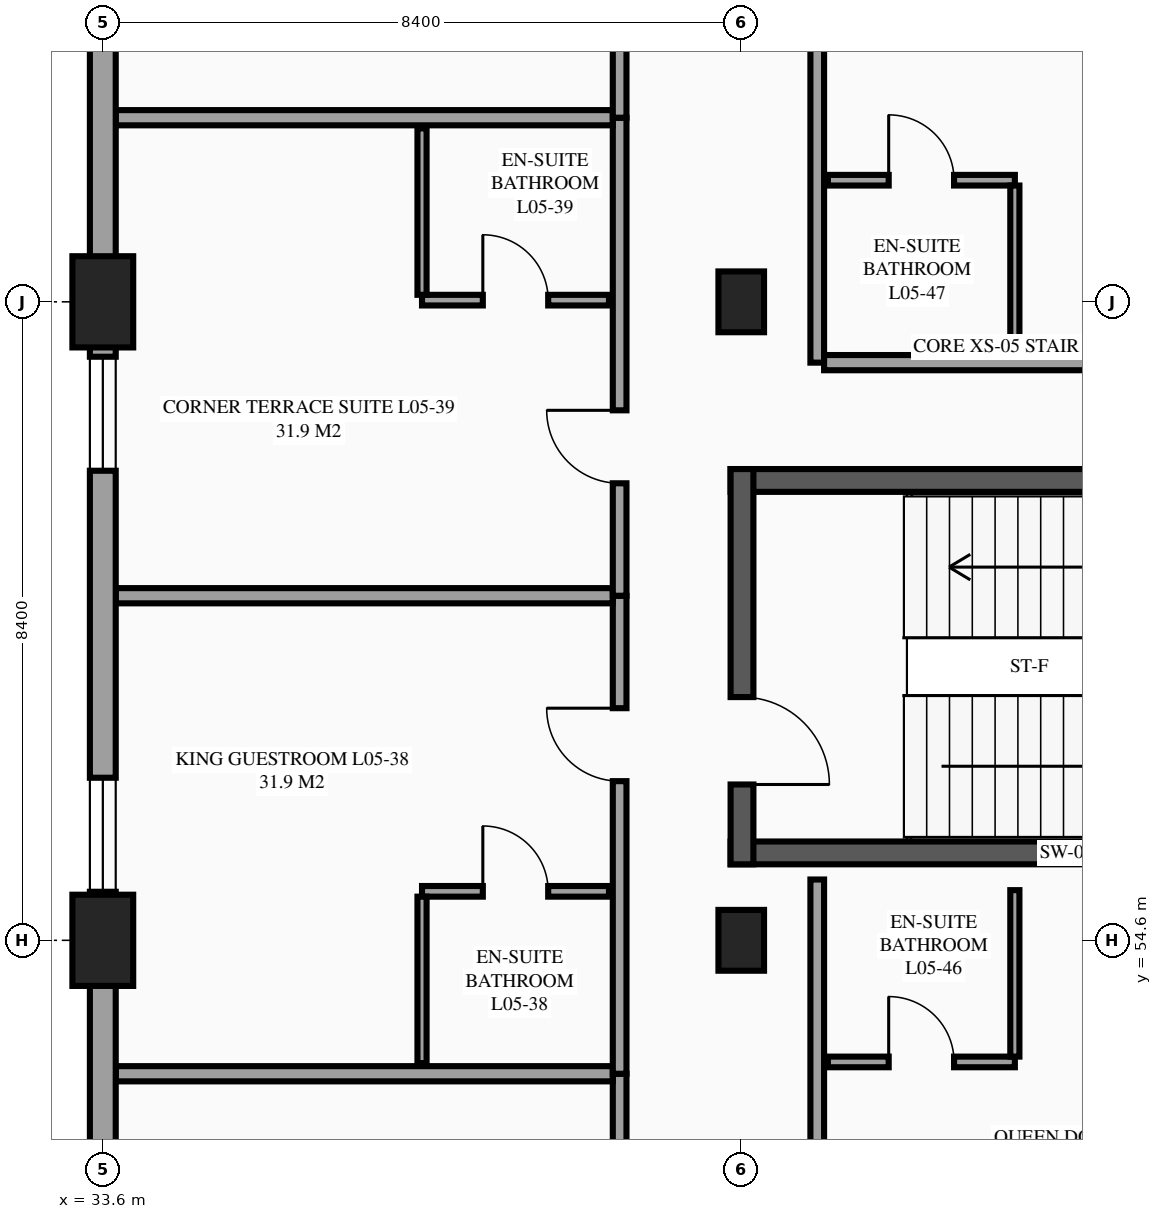
"""IFC4 building model, lengths in metres.
Left out: names, types, materials, properties, quantities, classifications, styles, units other than length and angle.
Written with IfcOpenShell. Run it as: python <this file> out.ifc"""

import sys

from ifc_helpers import new_model, si_unit, direction, frame, frame_2d, origin, origin_2d, place, context, subcontext, project, spatial, rectangle, extrude, element, fill, save


model = new_model("IFC4")
c1 = context("Model", 3, precision=1e-05, world=origin(), true_north=direction((0.0, 1.0)))
c2 = subcontext(c1, "Body", "Model", "MODEL_VIEW")
j1 = project(units=[si_unit("LENGTHUNIT", "METRE"), si_unit("PLANEANGLEUNIT", "RADIAN")], contexts=[c1])
p1 = place(None, origin())
s1 = spatial("IfcSite", under=j1, at=p1, CompositionType="ELEMENT")
p2 = place(p1, origin())
s2 = spatial("IfcBuilding", under=s1, at=p2, CompositionType="ELEMENT")
p3 = place(p2, frame((0.0, 0.0, 21.9)))
s3 = spatial("IfcBuildingStorey", under=s2, at=p3, CompositionType="ELEMENT", Elevation=21.9)
for number, where, z_axis, x_axis in (
    (1, (33.6, 54.6, 0.0), (0.0, 0.0, 1.0), (1.0, 0.0, 0.0)),
    (2, (33.6, 63.0, 0.0), (0.0, 0.0, 1.0), (1.0, 0.0, 0.0)),
):
    element("IfcColumn", number, at=place(p3, frame(where, z_axis=z_axis, x_axis=x_axis)), inside=s3, PredefinedType="COLUMN", context=c2, shape_type="SweptSolid", body=[
        extrude(rectangle(XDim=0.8, YDim=1.2, at=origin_2d()), origin(), (0.0, 0.0, 1.0), 3.6),
    ])
for number, where, z_axis, x_axis in (
    (3, (42.0, 54.6, 0.0), (0.0, 0.0, 1.0), (1.0, 0.0, 0.0)),
    (4, (42.0, 63.0, 0.0), (0.0, 0.0, 1.0), (1.0, 0.0, 0.0)),
):
    element("IfcColumn", number, at=place(p3, frame(where, z_axis=z_axis, x_axis=x_axis)), inside=s3, PredefinedType="COLUMN", context=c2, shape_type="SweptSolid", body=[
        extrude(rectangle(XDim=0.6, YDim=0.8, at=origin_2d()), origin(), (0.0, 0.0, 1.0), 3.6),
    ])
for number, where, z_axis, x_axis in (
    (5, (41.86, 55.75, 0.0), (0.0, 0.0, 1.0), (1.0, 0.0, 0.0)),
    (6, (50.7, 60.65, 0.0), (0.0, 0.0, 1.0), (-1.0, 0.0, 0.0)),
):
    element("IfcWall", number, at=place(p3, frame(where, z_axis=z_axis, x_axis=x_axis)), inside=s3, PredefinedType="SHEAR", context=c2, shape_type="SweptSolid", body=[
        extrude(rectangle(XDim=8.84, YDim=0.3, at=frame_2d((4.42, 0.0))), origin(), (0.0, 0.0, 1.0), 3.6),
    ])
p4 = place(p3, frame((42.01, 60.8, 0.0), z_axis=(0.0, 0.0, 1.0), x_axis=(0.0, -1.0, 0.0)))
e7 = element("IfcWall", 7, at=p4, inside=s3, PredefinedType="SHEAR", context=c2, shape_type="SweptSolid", body=[
    extrude(rectangle(XDim=5.2, YDim=0.3, at=frame_2d((2.6, 0.0))), origin(), (0.0, 0.0, 1.0), 3.6),
])
p5 = place(p4, frame((3.0, 0.0, 0.0)))
e8 = element("IfcOpeningElement", 8, at=p5, cuts=e7, PredefinedType="OPENING", context=c2, shape_type="SweptSolid", body=[
    extrude(rectangle(XDim=1.15, YDim=2.15, at=frame_2d((0.575, 1.075))), frame((0.0, 0.16, 0.0), z_axis=(0.0, -1.0, 0.0), x_axis=(1.0, 0.0, 0.0)), (0.0, 0.0, 1.0), 0.32),
])
p6 = place(p3, frame((40.4, 46.556, 0.0), z_axis=(0.0, 0.0, 1.0), x_axis=(0.0, 1.0, 0.0)))
e9 = element("IfcWall", 9, at=p6, inside=s3, PredefinedType="PARTITIONING", context=c2, shape_type="SweptSolid", body=[
    extrude(rectangle(XDim=6.289, YDim=0.18, at=frame_2d((3.145, 0.0))), origin(), (0.0, 0.0, 1.0), 3.375),
])
p7 = place(p6, frame((3.849, 0.0, 0.0)))
e10 = element("IfcOpeningElement", 10, at=p7, cuts=e9, PredefinedType="OPENING", context=c2, shape_type="SweptSolid", body=[
    extrude(rectangle(XDim=0.96, YDim=2.15, at=frame_2d((0.48, 1.075))), frame((0.0, 0.1, 0.0), z_axis=(0.0, -1.0, 0.0), x_axis=(1.0, 0.0, 0.0)), (0.0, 0.0, 1.0), 0.2),
])
p8 = place(p3, frame((33.77, 52.844, 0.0), z_axis=(0.0, 0.0, 1.0), x_axis=(1.0, 0.0, 0.0)))
e11 = element("IfcWall", 11, at=p8, inside=s3, PredefinedType="PARTITIONING", context=c2, shape_type="SweptSolid", body=[
    extrude(rectangle(XDim=6.54, YDim=0.2, at=frame_2d((3.27, 0.0))), origin(), (0.0, 0.0, 1.0), 3.375),
])
p9 = place(p3, frame((40.4, 52.844, 0.0), z_axis=(0.0, 0.0, 1.0), x_axis=(0.0, 1.0, 0.0)))
e12 = element("IfcWall", 12, at=p9, inside=s3, PredefinedType="PARTITIONING", context=c2, shape_type="SweptSolid", body=[
    extrude(rectangle(XDim=6.289, YDim=0.18, at=frame_2d((3.145, 0.0))), origin(), (0.0, 0.0, 1.0), 3.375),
])
p10 = place(p9, frame((3.85, 0.0, 0.0)))
e13 = element("IfcOpeningElement", 13, at=p10, cuts=e12, PredefinedType="OPENING", context=c2, shape_type="SweptSolid", body=[
    extrude(rectangle(XDim=0.96, YDim=2.15, at=frame_2d((0.48, 1.075))), frame((0.0, 0.1, 0.0), z_axis=(0.0, -1.0, 0.0), x_axis=(1.0, 0.0, 0.0)), (0.0, 0.0, 1.0), 0.2),
])
p11 = place(p3, frame((33.77, 59.133, 0.0), z_axis=(0.0, 0.0, 1.0), x_axis=(1.0, 0.0, 0.0)))
e14 = element("IfcWall", 14, at=p11, inside=s3, PredefinedType="PARTITIONING", context=c2, shape_type="SweptSolid", body=[
    extrude(rectangle(XDim=6.54, YDim=0.2, at=frame_2d((3.27, 0.0))), origin(), (0.0, 0.0, 1.0), 3.375),
])
p12 = place(p3, frame((37.8, 55.244, 0.0), z_axis=(0.0, 0.0, 1.0), x_axis=(1.0, 0.0, 0.0)))
e15 = element("IfcWall", 15, at=p12, inside=s3, PredefinedType="PARTITIONING", context=c2, shape_type="SweptSolid", body=[
    extrude(rectangle(XDim=2.46, YDim=0.14, at=frame_2d((1.23, 0.0))), origin(), (0.0, 0.0, 1.0), 3.375),
])
p13 = place(p12, frame((0.8, 0.0, 0.0)))
e16 = element("IfcOpeningElement", 16, at=p13, cuts=e15, PredefinedType="OPENING", context=c2, shape_type="SweptSolid", body=[
    extrude(rectangle(XDim=0.86, YDim=2.1, at=frame_2d((0.43, 1.05))), frame((0.0, 0.08, 0.0), z_axis=(0.0, -1.0, 0.0), x_axis=(1.0, 0.0, 0.0)), (0.0, 0.0, 1.0), 0.16),
])
p14 = place(p3, frame((37.8, 52.984, 0.0), z_axis=(0.0, 0.0, 1.0), x_axis=(0.0, 1.0, 0.0)))
e17 = element("IfcWall", 17, at=p14, inside=s3, PredefinedType="PARTITIONING", context=c2, shape_type="SweptSolid", body=[
    extrude(rectangle(XDim=2.19, YDim=0.12, at=frame_2d((1.095, 0.0))), origin(), (0.0, 0.0, 1.0), 3.375),
])
p15 = place(p3, frame((40.4, 59.133, 0.0), z_axis=(0.0, 0.0, 1.0), x_axis=(0.0, 1.0, 0.0)))
e18 = element("IfcWall", 18, at=p15, inside=s3, PredefinedType="PARTITIONING", context=c2, shape_type="SweptSolid", body=[
    extrude(rectangle(XDim=6.289, YDim=0.18, at=frame_2d((3.145, 0.0))), origin(), (0.0, 0.0, 1.0), 3.375),
])
p16 = place(p15, frame((1.479, 0.0, 0.0)))
e19 = element("IfcOpeningElement", 19, at=p16, cuts=e18, PredefinedType="OPENING", context=c2, shape_type="SweptSolid", body=[
    extrude(rectangle(XDim=0.96, YDim=2.15, at=frame_2d((0.48, 1.075))), frame((0.0, 0.1, 0.0), z_axis=(0.0, -1.0, 0.0), x_axis=(1.0, 0.0, 0.0)), (0.0, 0.0, 1.0), 0.2),
])
p17 = place(p3, frame((33.77, 65.422, 0.0), z_axis=(0.0, 0.0, 1.0), x_axis=(1.0, 0.0, 0.0)))
e20 = element("IfcWall", 20, at=p17, inside=s3, PredefinedType="PARTITIONING", context=c2, shape_type="SweptSolid", body=[
    extrude(rectangle(XDim=6.54, YDim=0.2, at=frame_2d((3.27, 0.0))), origin(), (0.0, 0.0, 1.0), 3.375),
])
p18 = place(p3, frame((37.8, 63.022, 0.0), z_axis=(0.0, 0.0, 1.0), x_axis=(1.0, 0.0, 0.0)))
e21 = element("IfcWall", 21, at=p18, inside=s3, PredefinedType="PARTITIONING", context=c2, shape_type="SweptSolid", body=[
    extrude(rectangle(XDim=2.46, YDim=0.14, at=frame_2d((1.23, 0.0))), origin(), (0.0, 0.0, 1.0), 2.68),
])
p19 = place(p18, frame((0.8, 0.0, 0.0)))
e22 = element("IfcOpeningElement", 22, at=p19, cuts=e21, PredefinedType="OPENING", context=c2, shape_type="SweptSolid", body=[
    extrude(rectangle(XDim=0.86, YDim=2.1, at=frame_2d((0.43, 1.05))), frame((0.0, 0.08, 0.0), z_axis=(0.0, -1.0, 0.0), x_axis=(1.0, 0.0, 0.0)), (0.0, 0.0, 1.0), 0.16),
])
p20 = place(p3, frame((37.8, 63.092, 0.0), z_axis=(0.0, 0.0, 1.0), x_axis=(0.0, 1.0, 0.0)))
e23 = element("IfcWall", 23, at=p20, inside=s3, PredefinedType="PARTITIONING", context=c2, shape_type="SweptSolid", body=[
    extrude(rectangle(XDim=2.19, YDim=0.12, at=frame_2d((1.095, 0.0))), origin(), (0.0, 0.0, 1.0), 3.375),
])
p21 = place(p3, frame((40.4, 65.422, 0.0), z_axis=(0.0, 0.0, 1.0), x_axis=(0.0, 1.0, 0.0)))
e24 = element("IfcWall", 24, at=p21, inside=s3, PredefinedType="PARTITIONING", context=c2, shape_type="SweptSolid", body=[
    extrude(rectangle(XDim=6.289, YDim=0.18, at=frame_2d((3.145, 0.0))), origin(), (0.0, 0.0, 1.0), 3.375),
])
p22 = place(p21, frame((1.479, 0.0, 0.0)))
e25 = element("IfcOpeningElement", 25, at=p22, cuts=e24, PredefinedType="OPENING", context=c2, shape_type="SweptSolid", body=[
    extrude(rectangle(XDim=0.96, YDim=2.15, at=frame_2d((0.48, 1.075))), frame((0.0, 0.1, 0.0), z_axis=(0.0, -1.0, 0.0), x_axis=(1.0, 0.0, 0.0)), (0.0, 0.0, 1.0), 0.2),
])
p23 = place(p3, frame((43.0, 49.4, 0.0), z_axis=(0.0, 0.0, 1.0), x_axis=(0.0, 1.0, 0.0)))
e26 = element("IfcWall", 26, at=p23, inside=s3, PredefinedType="PARTITIONING", context=c2, shape_type="SweptSolid", body=[
    extrude(rectangle(XDim=6.0, YDim=0.18, at=frame_2d((3.0, 0.0))), origin(), (0.0, 0.0, 1.0), 3.375),
])
p24 = place(p23, frame((1.335, 0.0, 0.0)))
e27 = element("IfcOpeningElement", 27, at=p24, cuts=e26, PredefinedType="OPENING", context=c2, shape_type="SweptSolid", body=[
    extrude(rectangle(XDim=0.96, YDim=2.15, at=frame_2d((0.48, 1.075))), frame((0.0, 0.1, 0.0), z_axis=(0.0, -1.0, 0.0), x_axis=(1.0, 0.0, 0.0)), (0.0, 0.0, 1.0), 0.2),
])
p25 = place(p3, frame((43.14, 53.0, 0.0), z_axis=(0.0, 0.0, 1.0), x_axis=(1.0, 0.0, 0.0)))
e28 = element("IfcWall", 28, at=p25, inside=s3, PredefinedType="PARTITIONING", context=c2, shape_type="SweptSolid", body=[
    extrude(rectangle(XDim=2.46, YDim=0.14, at=frame_2d((1.23, 0.0))), origin(), (0.0, 0.0, 1.0), 3.375),
])
p26 = place(p25, frame((0.8, 0.0, 0.0)))
e29 = element("IfcOpeningElement", 29, at=p26, cuts=e28, PredefinedType="OPENING", context=c2, shape_type="SweptSolid", body=[
    extrude(rectangle(XDim=0.86, YDim=2.1, at=frame_2d((0.43, 1.05))), frame((0.0, 0.08, 0.0), z_axis=(0.0, -1.0, 0.0), x_axis=(1.0, 0.0, 0.0)), (0.0, 0.0, 1.0), 0.16),
])
p27 = place(p3, frame((45.6, 53.07, 0.0), z_axis=(0.0, 0.0, 1.0), x_axis=(0.0, 1.0, 0.0)))
e30 = element("IfcWall", 30, at=p27, inside=s3, PredefinedType="PARTITIONING", context=c2, shape_type="SweptSolid", body=[
    extrude(rectangle(XDim=2.19, YDim=0.12, at=frame_2d((1.095, 0.0))), origin(), (0.0, 0.0, 1.0), 3.375),
])
p28 = place(p3, frame((43.0, 62.2, 0.0), z_axis=(0.0, 0.0, 1.0), x_axis=(0.0, 1.0, 0.0)))
e31 = element("IfcWall", 31, at=p28, inside=s3, PredefinedType="PARTITIONING", context=c2, shape_type="SweptSolid", body=[
    extrude(rectangle(XDim=7.9, YDim=0.18, at=frame_2d((3.95, 0.0))), origin(), (0.0, 0.0, 1.0), 3.375),
])
p29 = place(p28, frame((4.655, 0.0, 0.0)))
e32 = element("IfcOpeningElement", 32, at=p29, cuts=e31, PredefinedType="OPENING", context=c2, shape_type="SweptSolid", body=[
    extrude(rectangle(XDim=0.96, YDim=2.15, at=frame_2d((0.48, 1.075))), frame((0.0, 0.1, 0.0), z_axis=(0.0, -1.0, 0.0), x_axis=(1.0, 0.0, 0.0)), (0.0, 0.0, 1.0), 0.2),
])
p30 = place(p3, frame((43.09, 62.2, 0.0), z_axis=(0.0, 0.0, 1.0), x_axis=(1.0, 0.0, 0.0)))
e33 = element("IfcWall", 33, at=p30, inside=s3, PredefinedType="PARTITIONING", context=c2, shape_type="SweptSolid", body=[
    extrude(rectangle(XDim=7.14, YDim=0.2, at=frame_2d((3.57, 0.0))), origin(), (0.0, 0.0, 1.0), 3.375),
])
p31 = place(p3, frame((43.14, 64.6, 0.0), z_axis=(0.0, 0.0, 1.0), x_axis=(1.0, 0.0, 0.0)))
e34 = element("IfcWall", 34, at=p31, inside=s3, PredefinedType="PARTITIONING", context=c2, shape_type="SweptSolid", body=[
    extrude(rectangle(XDim=2.46, YDim=0.14, at=frame_2d((1.23, 0.0))), origin(), (0.0, 0.0, 1.0), 3.375),
])
p32 = place(p31, frame((0.8, 0.0, 0.0)))
e35 = element("IfcOpeningElement", 35, at=p32, cuts=e34, PredefinedType="OPENING", context=c2, shape_type="SweptSolid", body=[
    extrude(rectangle(XDim=0.86, YDim=2.1, at=frame_2d((0.43, 1.05))), frame((0.0, 0.08, 0.0), z_axis=(0.0, -1.0, 0.0), x_axis=(1.0, 0.0, 0.0)), (0.0, 0.0, 1.0), 0.16),
])
p33 = place(p3, frame((45.6, 62.34, 0.0), z_axis=(0.0, 0.0, 1.0), x_axis=(0.0, 1.0, 0.0)))
e36 = element("IfcWall", 36, at=p33, inside=s3, PredefinedType="PARTITIONING", context=c2, shape_type="SweptSolid", body=[
    extrude(rectangle(XDim=2.19, YDim=0.12, at=frame_2d((1.095, 0.0))), origin(), (0.0, 0.0, 1.0), 3.375),
])
p34 = place(p3, frame((33.6, 79.8, 0.0), z_axis=(0.0, 0.0, 1.0), x_axis=(0.0, -1.0, 0.0)))
e37 = element("IfcWall", 37, at=p34, inside=s3, PredefinedType="STANDARD", context=c2, shape_type="SweptSolid", body=[
    extrude(rectangle(XDim=16.8, YDim=0.34, at=frame_2d((8.4, 0.0))), origin(), (0.0, 0.0, 1.0), 2.63),
])
p35 = place(p34, frame((10.633, 0.0, 0.85)))
e38 = element("IfcOpeningElement", 38, at=p35, cuts=e37, PredefinedType="OPENING", context=c2, shape_type="SweptSolid", body=[
    extrude(rectangle(XDim=1.2, YDim=1.5, at=frame_2d((0.6, 0.75))), frame((0.0, 0.18, 0.0), z_axis=(0.0, -1.0, 0.0), x_axis=(1.0, 0.0, 0.0)), (0.0, 0.0, 1.0), 0.36),
])
p36 = place(p34, frame((4.195, 0.0, 0.85)))
e39 = element("IfcOpeningElement", 39, at=p36, cuts=e37, PredefinedType="OPENING", context=c2, shape_type="SweptSolid", body=[
    extrude(rectangle(XDim=1.5, YDim=1.5, at=frame_2d((0.75, 0.75))), frame((0.0, 0.18, 0.0), z_axis=(0.0, -1.0, 0.0), x_axis=(1.0, 0.0, 0.0)), (0.0, 0.0, 1.0), 0.36),
])
p37 = place(p3, frame((33.6, 63.0, 0.0), z_axis=(0.0, 0.0, 1.0), x_axis=(0.0, -1.0, 0.0)))
e40 = element("IfcWall", 40, at=p37, inside=s3, PredefinedType="STANDARD", context=c2, shape_type="SweptSolid", body=[
    extrude(rectangle(XDim=8.4, YDim=0.34, at=frame_2d((4.2, 0.0))), origin(), (0.0, 0.0, 1.0), 3.126),
])
p38 = place(p37, frame((6.261, 0.0, 0.85)))
e41 = element("IfcOpeningElement", 41, at=p38, cuts=e40, PredefinedType="OPENING", context=c2, shape_type="SweptSolid", body=[
    extrude(rectangle(XDim=1.5, YDim=1.5, at=frame_2d((0.75, 0.75))), frame((0.0, 0.18, 0.0), z_axis=(0.0, -1.0, 0.0), x_axis=(1.0, 0.0, 0.0)), (0.0, 0.0, 1.0), 0.36),
])
p39 = place(p37, frame((0.722, 0.0, 0.85)))
e42 = element("IfcOpeningElement", 42, at=p39, cuts=e40, PredefinedType="OPENING", context=c2, shape_type="SweptSolid", body=[
    extrude(rectangle(XDim=1.5, YDim=1.5, at=frame_2d((0.75, 0.75))), frame((0.0, 0.18, 0.0), z_axis=(0.0, -1.0, 0.0), x_axis=(1.0, 0.0, 0.0)), (0.0, 0.0, 1.0), 0.36),
])
p40 = place(p3, frame((33.6, 54.6, 0.0), z_axis=(0.0, 0.0, 1.0), x_axis=(0.0, -1.0, 0.0)))
e43 = element("IfcWall", 43, at=p40, inside=s3, PredefinedType="STANDARD", context=c2, shape_type="SweptSolid", body=[
    extrude(rectangle(XDim=8.4, YDim=0.34, at=frame_2d((4.2, 0.0))), origin(), (0.0, 0.0, 1.0), 2.58),
])
p41 = place(p40, frame((4.15, 0.0, 0.85)))
e44 = element("IfcOpeningElement", 44, at=p41, cuts=e43, PredefinedType="OPENING", context=c2, shape_type="SweptSolid", body=[
    extrude(rectangle(XDim=1.5, YDim=1.5, at=frame_2d((0.75, 0.75))), frame((0.0, 0.18, 0.0), z_axis=(0.0, -1.0, 0.0), x_axis=(1.0, 0.0, 0.0)), (0.0, 0.0, 1.0), 0.36),
])
p42 = place(p38, origin())
e45 = element("IfcWindow", 45, at=p42, inside=s3, PartitioningType="SINGLE_PANEL", PredefinedType="WINDOW", context=c2, shape_type="SweptSolid", body=[
    extrude(rectangle(XDim=1.5, YDim=1.5, at=frame_2d((0.75, 0.75))), frame((0.0, 0.03, 0.0), z_axis=(0.0, -1.0, 0.0), x_axis=(1.0, 0.0, 0.0)), (0.0, 0.0, 1.0), 0.06),
])
fill(e41, e45)
p43 = place(p39, origin())
e46 = element("IfcWindow", 46, at=p43, inside=s3, PartitioningType="SINGLE_PANEL", PredefinedType="WINDOW", context=c2, shape_type="SweptSolid", body=[
    extrude(rectangle(XDim=1.5, YDim=1.5, at=frame_2d((0.75, 0.75))), frame((0.0, 0.03, 0.0), z_axis=(0.0, -1.0, 0.0), x_axis=(1.0, 0.0, 0.0)), (0.0, 0.0, 1.0), 0.06),
])
fill(e42, e46)
p44 = place(p5, origin())
e47 = element("IfcDoor", 47, at=p44, inside=s3, OperationType="SINGLE_SWING_RIGHT", PredefinedType="DOOR", context=c2, shape_type="SweptSolid", body=[
    extrude(rectangle(XDim=1.15, YDim=2.15, at=frame_2d((0.575, 1.075))), frame((0.0, 0.025, 0.0), z_axis=(0.0, -1.0, 0.0), x_axis=(1.0, 0.0, 0.0)), (0.0, 0.0, 1.0), 0.05),
])
fill(e8, e47)
p45 = place(p10, origin())
e48 = element("IfcDoor", 48, at=p45, inside=s3, OperationType="SINGLE_SWING_RIGHT", PredefinedType="DOOR", context=c2, shape_type="SweptSolid", body=[
    extrude(rectangle(XDim=0.96, YDim=2.15, at=frame_2d((0.48, 1.075))), frame((0.0, 0.025, 0.0), z_axis=(0.0, -1.0, 0.0), x_axis=(1.0, 0.0, 0.0)), (0.0, 0.0, 1.0), 0.05),
])
fill(e13, e48)
p46 = place(p13, origin())
e49 = element("IfcDoor", 49, at=p46, inside=s3, OperationType="SINGLE_SWING_LEFT", PredefinedType="DOOR", context=c2, shape_type="SweptSolid", body=[
    extrude(rectangle(XDim=0.86, YDim=2.1, at=frame_2d((0.43, 1.05))), frame((0.0, 0.025, 0.0), z_axis=(0.0, -1.0, 0.0), x_axis=(1.0, 0.0, 0.0)), (0.0, 0.0, 1.0), 0.05),
])
fill(e16, e49)
p47 = place(p16, origin())
e50 = element("IfcDoor", 50, at=p47, inside=s3, OperationType="SINGLE_SWING_RIGHT", PredefinedType="DOOR", context=c2, shape_type="SweptSolid", body=[
    extrude(rectangle(XDim=0.96, YDim=2.15, at=frame_2d((0.48, 1.075))), frame((0.0, 0.025, 0.0), z_axis=(0.0, -1.0, 0.0), x_axis=(1.0, 0.0, 0.0)), (0.0, 0.0, 1.0), 0.05),
])
fill(e19, e50)
p48 = place(p19, origin())
e51 = element("IfcDoor", 51, at=p48, inside=s3, OperationType="SINGLE_SWING_LEFT", PredefinedType="DOOR", context=c2, shape_type="SweptSolid", body=[
    extrude(rectangle(XDim=0.86, YDim=2.1, at=frame_2d((0.43, 1.05))), frame((0.0, 0.025, 0.0), z_axis=(0.0, -1.0, 0.0), x_axis=(1.0, 0.0, 0.0)), (0.0, 0.0, 1.0), 0.05),
])
fill(e22, e51)
p49 = place(p26, origin())
e52 = element("IfcDoor", 52, at=p49, inside=s3, OperationType="SINGLE_SWING_LEFT", PredefinedType="DOOR", context=c2, shape_type="SweptSolid", body=[
    extrude(rectangle(XDim=0.86, YDim=2.1, at=frame_2d((0.43, 1.05))), frame((0.0, 0.025, 0.0), z_axis=(0.0, -1.0, 0.0), x_axis=(1.0, 0.0, 0.0)), (0.0, 0.0, 1.0), 0.05),
])
fill(e29, e52)
p50 = place(p32, origin())
e53 = element("IfcDoor", 53, at=p50, inside=s3, OperationType="SINGLE_SWING_LEFT", PredefinedType="DOOR", context=c2, shape_type="SweptSolid", body=[
    extrude(rectangle(XDim=0.86, YDim=2.1, at=frame_2d((0.43, 1.05))), frame((0.0, 0.025, 0.0), z_axis=(0.0, -1.0, 0.0), x_axis=(1.0, 0.0, 0.0)), (0.0, 0.0, 1.0), 0.05),
])
fill(e35, e53)
save(model, sys.argv[1])
